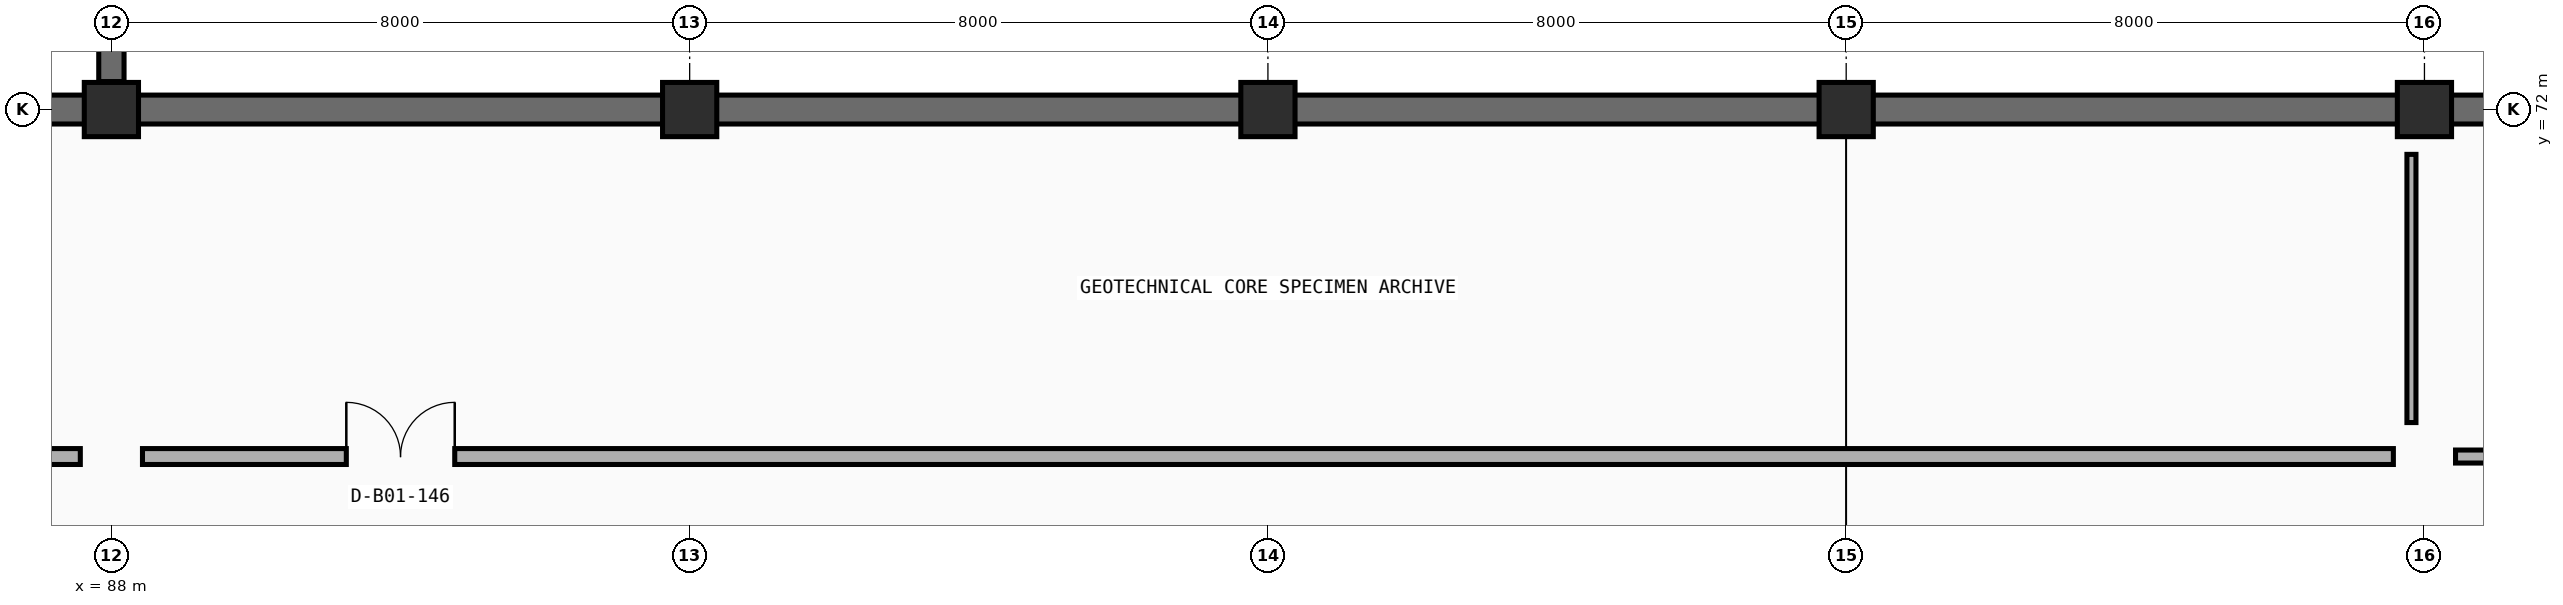
"""IFC4 building model, lengths in metres.
Left out: names, types, materials, properties, quantities, classifications, styles, units other than length and angle.
Written with IfcOpenShell. Run it as: python <this file> out.ifc"""

import sys

from ifc_helpers import new_model, si_unit, direction, frame, frame_2d, origin, origin_2d, place, context, subcontext, project, spatial, rectangle, extrude, element, fill, save


model = new_model("IFC4")
c1 = context("Model", 3, precision=1e-05, world=origin(), true_north=direction((0.0, 1.0)))
c2 = subcontext(c1, "Body", "Model", "MODEL_VIEW")
j1 = project(units=[si_unit("LENGTHUNIT", "METRE"), si_unit("PLANEANGLEUNIT", "RADIAN")], contexts=[c1])
p1 = place(None, origin())
s1 = spatial("IfcSite", under=j1, at=p1, CompositionType="ELEMENT")
p2 = place(p1, origin())
s2 = spatial("IfcBuilding", under=s1, at=p2, CompositionType="ELEMENT")
p3 = place(p2, frame((0.0, 0.0, -4.5)))
s3 = spatial("IfcBuildingStorey", under=s2, at=p3, CompositionType="ELEMENT", Elevation=-4.5)
for number, where, z_axis, x_axis in (
    (1, (88.0, 72.0, -0.405), (0.0, 0.0, 1.0), (1.0, 0.0, 0.0)),
    (2, (96.0, 72.0, -0.405), (0.0, 0.0, 1.0), (1.0, 0.0, 0.0)),
    (3, (104.0, 72.0, -0.405), (0.0, 0.0, 1.0), (1.0, 0.0, 0.0)),
    (4, (112.0, 72.0, -0.405), (0.0, 0.0, 1.0), (1.0, 0.0, 0.0)),
    (5, (120.0, 72.0, -0.405), (0.0, 0.0, 1.0), (1.0, 0.0, 0.0)),
):
    element("IfcColumn", number, at=place(p3, frame(where, z_axis=z_axis, x_axis=x_axis)), inside=s3, PredefinedType="COLUMN", context=c2, shape_type="SweptSolid", body=[
        extrude(rectangle(XDim=0.75, YDim=0.75, at=origin_2d()), origin(), (0.0, 0.0, 1.0), 4.905),
    ])
for number, where, z_axis, x_axis in (
    (6, (80.35, 72.0, 0.0), (0.0, 0.0, 1.0), (1.0, 0.0, 0.0)),
    (7, (88.35, 72.0, 0.0), (0.0, 0.0, 1.0), (1.0, 0.0, 0.0)),
    (8, (96.35, 72.0, 0.0), (0.0, 0.0, 1.0), (1.0, 0.0, 0.0)),
    (9, (104.35, 72.0, 0.0), (0.0, 0.0, 1.0), (1.0, 0.0, 0.0)),
    (10, (112.35, 72.0, 0.0), (0.0, 0.0, 1.0), (1.0, 0.0, 0.0)),
    (11, (120.35, 72.0, 0.0), (0.0, 0.0, 1.0), (1.0, 0.0, 0.0)),
):
    element("IfcWall", number, at=place(p3, frame(where, z_axis=z_axis, x_axis=x_axis)), inside=s3, PredefinedType="USERDEFINED", context=c2, shape_type="SweptSolid", body=[
        extrude(rectangle(XDim=7.3, YDim=0.4, at=frame_2d((3.65, 0.0))), origin(), (0.0, 0.0, 1.0), 4.095),
    ])
p4 = place(p3, frame((88.0, 72.387, -0.405), z_axis=(0.0, 0.0, 1.0), x_axis=(0.0, 1.0, 0.0)))
e12 = element("IfcWall", 12, at=p4, inside=s3, PredefinedType="USERDEFINED", context=c2, shape_type="SweptSolid", body=[
    extrude(rectangle(XDim=7.423, YDim=0.35, at=frame_2d((3.712, 0.0))), origin(), (0.0, 0.0, 1.0), 4.62),
])
p5 = place(p3, frame((56.43, 67.2, 0.0), z_axis=(0.0, 0.0, 1.0), x_axis=(1.0, 0.0, 0.0)))
e13 = element("IfcWall", 13, at=p5, inside=s3, PredefinedType="PARTITIONING", context=c2, shape_type="SweptSolid", body=[
    extrude(rectangle(XDim=31.14, YDim=0.22, at=frame_2d((15.57, 0.0))), origin(), (0.0, 0.0, 1.0), 3.6),
])
p6 = place(p5, frame((2.82, 0.0, 0.0)))
e14 = element("IfcOpeningElement", 14, at=p6, cuts=e13, PredefinedType="OPENING", context=c2, shape_type="SweptSolid", body=[
    extrude(rectangle(XDim=1.5, YDim=2.2, at=frame_2d((0.75, 1.1))), frame((0.0, 0.12, 0.0), z_axis=(0.0, -1.0, 0.0), x_axis=(1.0, 0.0, 0.0)), (0.0, 0.0, 1.0), 0.24),
])
p7 = place(p3, frame((88.43, 67.2, 0.0), z_axis=(0.0, 0.0, 1.0), x_axis=(1.0, 0.0, 0.0)))
e15 = element("IfcWall", 15, at=p7, inside=s3, PredefinedType="PARTITIONING", context=c2, shape_type="SweptSolid", body=[
    extrude(rectangle(XDim=31.14, YDim=0.22, at=frame_2d((15.57, 0.0))), origin(), (0.0, 0.0, 1.0), 3.6),
])
p8 = place(p7, frame((2.82, 0.0, 0.0)))
e16 = element("IfcOpeningElement", 16, at=p8, cuts=e15, PredefinedType="OPENING", context=c2, shape_type="SweptSolid", body=[
    extrude(rectangle(XDim=1.5, YDim=2.2, at=frame_2d((0.75, 1.1))), frame((0.0, 0.12, 0.0), z_axis=(0.0, -1.0, 0.0), x_axis=(1.0, 0.0, 0.0)), (0.0, 0.0, 1.0), 0.24),
])
p9 = place(p3, frame((119.82, 67.67, 0.0), z_axis=(0.0, 0.0, 1.0), x_axis=(0.0, 1.0, 0.0)))
e17 = element("IfcWall", 17, at=p9, inside=s3, PredefinedType="PARTITIONING", context=c2, shape_type="SweptSolid", body=[
    extrude(rectangle(XDim=3.71, YDim=0.125, at=frame_2d((1.855, 0.0))), origin(), (0.0, 0.0, 1.0), 3.27),
])
p10 = place(p3, frame((120.43, 67.2, 0.0), z_axis=(0.0, 0.0, 1.0), x_axis=(1.0, 0.0, 0.0)))
e18 = element("IfcWall", 18, at=p10, inside=s3, PredefinedType="PARTITIONING", context=c2, shape_type="SweptSolid", body=[
    extrude(rectangle(XDim=31.14, YDim=0.18, at=frame_2d((15.57, 0.0))), origin(), (0.0, 0.0, 1.0), 3.6),
])
p11 = place(p10, frame((2.97, 0.0, 0.0)))
e19 = element("IfcOpeningElement", 19, at=p11, cuts=e18, PredefinedType="OPENING", context=c2, shape_type="SweptSolid", body=[
    extrude(rectangle(XDim=1.2, YDim=2.15, at=frame_2d((0.6, 1.075))), frame((0.0, 0.1, 0.0), z_axis=(0.0, -1.0, 0.0), x_axis=(1.0, 0.0, 0.0)), (0.0, 0.0, 1.0), 0.2),
])
p12 = place(p8, origin())
e20 = element("IfcDoor", 20, at=p12, inside=s3, OperationType="DOUBLE_DOOR_SINGLE_SWING", PredefinedType="DOOR", context=c2, shape_type="SweptSolid", body=[
    extrude(rectangle(XDim=1.5, YDim=2.2, at=frame_2d((0.75, 1.1))), frame((0.0, 0.025, 0.0), z_axis=(0.0, -1.0, 0.0), x_axis=(1.0, 0.0, 0.0)), (0.0, 0.0, 1.0), 0.05),
])
fill(e16, e20)
save(model, sys.argv[1])
